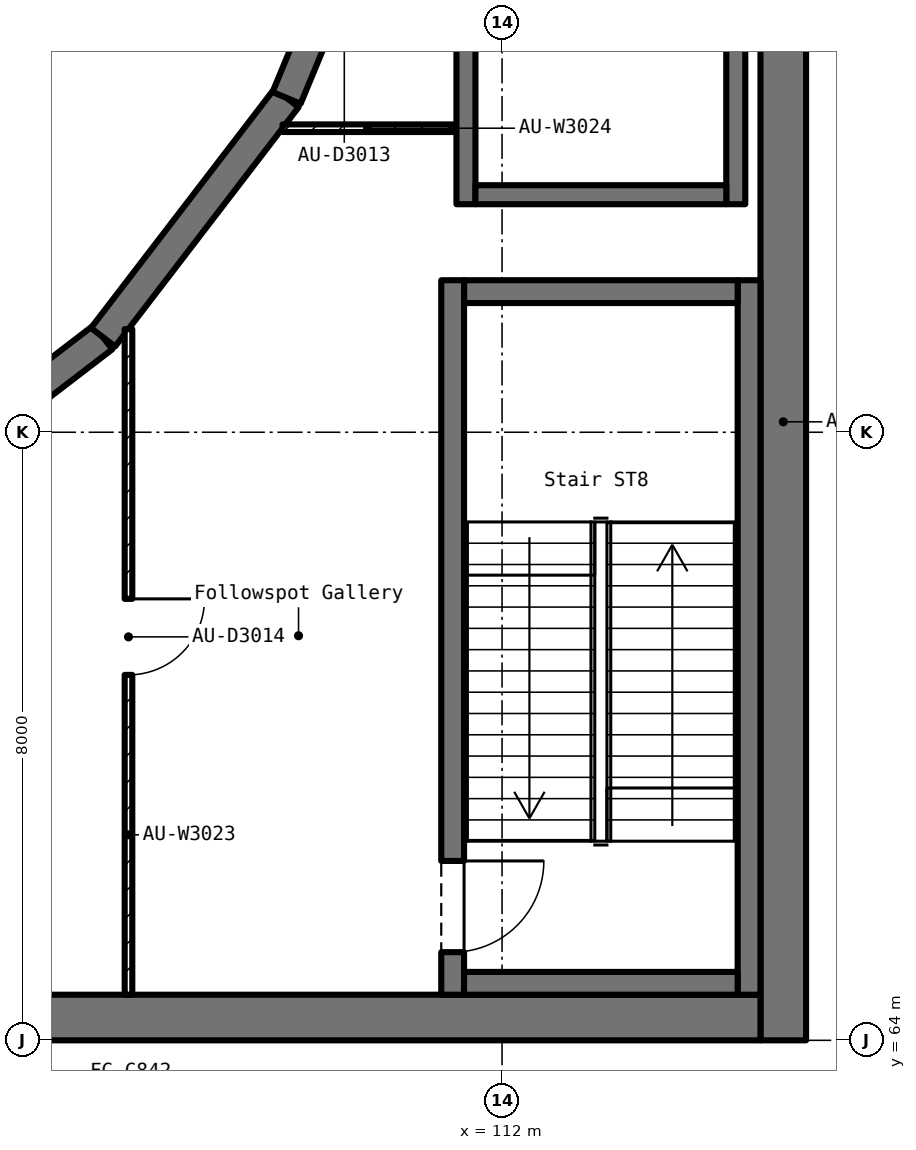
"""IFC4 building model, lengths in metres.
Left out: names, types, materials, properties, quantities, classifications, styles, units other than length and angle.
Written with IfcOpenShell. Run it as: python <this file> out.ifc"""

import sys

from ifc_helpers import new_model, si_unit, direction, frame, frame_2d, origin, place, context, subcontext, project, spatial, rectangle, extrude, element, fill, save


model = new_model("IFC4")
c1 = context("Model", 3, precision=1e-05, world=origin(), true_north=direction((0.0, 1.0)))
c2 = subcontext(c1, "Body", "Model", "MODEL_VIEW")
j1 = project(units=[si_unit("LENGTHUNIT", "METRE"), si_unit("PLANEANGLEUNIT", "RADIAN")], contexts=[c1])
p1 = place(None, origin())
s1 = spatial("IfcSite", under=j1, at=p1, CompositionType="ELEMENT")
p2 = place(p1, origin())
s2 = spatial("IfcBuilding", under=s1, at=p2, CompositionType="ELEMENT")
p3 = place(p2, frame((0.0, 0.0, 17.0)))
s3 = spatial("IfcBuildingStorey", under=s2, at=p3, CompositionType="ELEMENT", Elevation=17.0)
p4 = place(p3, frame((115.7, 64.0, 0.0), z_axis=(0.0, 0.0, 1.0), x_axis=(0.0, 1.0, 0.0)))
e1 = element("IfcWall", 1, at=p4, inside=s3, PredefinedType="SHEAR", context=c2, shape_type="SweptSolid", body=[
    extrude(rectangle(XDim=32.0, YDim=0.6, at=frame_2d((16.0, 0.0))), origin(), (0.0, 0.0, 1.0), 5.5),
])
p5 = place(p4, frame((16.275, 0.0, 1.0)))
e2 = element("IfcOpeningElement", 2, at=p5, cuts=e1, PredefinedType="OPENING", context=c2, shape_type="SweptSolid", body=[
    extrude(rectangle(XDim=0.45, YDim=3.6, at=frame_2d((0.225, 1.8))), frame((0.0, 0.312, 0.0), z_axis=(0.0, -1.0, 0.0), x_axis=(1.0, 0.0, 0.0)), (0.0, 0.0, 1.0), 0.624),
])
p6 = place(p4, frame((19.275, 0.0, 1.0)))
e3 = element("IfcOpeningElement", 3, at=p6, cuts=e1, PredefinedType="OPENING", context=c2, shape_type="SweptSolid", body=[
    extrude(rectangle(XDim=0.45, YDim=3.6, at=frame_2d((0.225, 1.8))), frame((0.0, 0.312, 0.0), z_axis=(0.0, -1.0, 0.0), x_axis=(1.0, 0.0, 0.0)), (0.0, 0.0, 1.0), 0.624),
])
p7 = place(p3, frame((76.6, 64.3, 0.0), z_axis=(0.0, 0.0, 1.0), x_axis=(1.0, 0.0, 0.0)))
e4 = element("IfcWall", 4, at=p7, inside=s3, PredefinedType="SHEAR", context=c2, shape_type="SweptSolid", body=[
    extrude(rectangle(XDim=38.8, YDim=0.6, at=frame_2d((19.4, 0.0))), origin(), (0.0, 0.0, 1.0), 5.5),
])
for number, where, z_axis, x_axis in (
    (5, (103.601, 70.835, 0.0), (0.0, 0.0, 1.0), (0.794, 0.609, 0.0)),
    (6, (106.75, 73.25, 0.0), (0.0, 0.0, 1.0), (0.609, 0.794, 0.0)),
):
    element("IfcWall", number, at=place(p3, frame(where, z_axis=z_axis, x_axis=x_axis)), inside=s3, PredefinedType="SHEAR", context=c2, shape_type="SweptSolid", body=[
        extrude(rectangle(XDim=3.969, YDim=0.4, at=frame_2d((1.984, 0.0))), origin(), (0.0, 0.0, 1.0), 5.5),
    ])
p8 = place(p3, frame((109.165, 76.399, 0.0), z_axis=(0.0, 0.0, 1.0), x_axis=(0.38271032831, 0.923868391388, 0.0)))
e7 = element("IfcWall", 7, at=p8, inside=s3, PredefinedType="SHEAR", context=c2, shape_type="SweptSolid", body=[
    extrude(rectangle(XDim=3.969, YDim=0.4, at=frame_2d((1.985, 0.0))), origin(), (0.0, 0.0, 1.0), 5.5),
])
p9 = place(p8, frame((1.084, 0.0, 0.0)))
e8 = element("IfcOpeningElement", 8, at=p9, cuts=e7, PredefinedType="OPENING", context=c2, shape_type="SweptSolid", body=[
    extrude(rectangle(XDim=1.8, YDim=2.1, at=frame_2d((0.9, 1.05))), frame((0.0, 0.212, 0.0), z_axis=(0.0, -1.0, 0.0), x_axis=(1.0, 0.0, 0.0)), (0.0, 0.0, 1.0), 0.424),
])
p10 = place(p3, frame((106.774, 62.848, 0.0), z_axis=(0.0, 0.0, 1.0), x_axis=(-0.990274070761, 0.13913038769, 0.0)))
e9 = element("IfcWall", 9, at=p10, inside=s3, PredefinedType="SOLIDWALL", context=c2, shape_type="SweptSolid", body=[
    extrude(rectangle(XDim=4.148, YDim=0.45, at=frame_2d((2.074, 0.0))), origin(), (0.0, 0.0, 1.0), 5.28),
])
p11 = place(p10, frame((1.074, 0.0, 1.0)))
e10 = element("IfcOpeningElement", 10, at=p11, cuts=e9, PredefinedType="OPENING", context=c2, shape_type="SweptSolid", body=[
    extrude(rectangle(XDim=2.0, YDim=2.8, at=frame_2d((1.0, 1.4))), frame((0.0, 0.237, 0.0), z_axis=(0.0, -1.0, 0.0), x_axis=(1.0, 0.0, 0.0)), (0.0, 0.0, 1.0), 0.474),
])
p12 = place(p3, frame((119.439, 72.137, 0.0), z_axis=(0.0, 0.0, 1.0), x_axis=(-0.961206014053, 0.275831467655, 0.0)))
e11 = element("IfcWall", 11, at=p12, inside=s3, PredefinedType="PARAPET", context=c2, shape_type="SweptSolid", body=[
    extrude(rectangle(XDim=3.571, YDim=0.3, at=frame_2d((1.786, 0.0))), origin(), (0.0, 0.0, 1.0), 1.1),
])
p13 = place(p3, frame((115.25, 64.6, 0.0), z_axis=(0.0, 0.0, 1.0), x_axis=(0.0, 1.0, 0.0)))
e12 = element("IfcWall", 12, at=p13, inside=s3, PredefinedType="SOLIDWALL", context=c2, shape_type="SweptSolid", body=[
    extrude(rectangle(XDim=9.4, YDim=0.3, at=frame_2d((4.7, 0.0))), origin(), (0.0, 0.0, 1.0), 5.5),
])
p14 = place(p3, frame((115.1, 73.85, 0.0), z_axis=(0.0, 0.0, 1.0), x_axis=(-1.0, 0.0, 0.0)))
e13 = element("IfcWall", 13, at=p14, inside=s3, PredefinedType="SOLIDWALL", context=c2, shape_type="SweptSolid", body=[
    extrude(rectangle(XDim=3.6, YDim=0.3, at=frame_2d((1.8, 0.0))), origin(), (0.0, 0.0, 1.0), 5.5),
])
p15 = place(p3, frame((111.35, 74.0, 0.0), z_axis=(0.0, 0.0, 1.0), x_axis=(0.0, -1.0, 0.0)))
e14 = element("IfcWall", 14, at=p15, inside=s3, PredefinedType="SOLIDWALL", context=c2, shape_type="SweptSolid", body=[
    extrude(rectangle(XDim=9.4, YDim=0.3, at=frame_2d((4.7, 0.0))), origin(), (0.0, 0.0, 1.0), 5.5),
])
p16 = place(p15, frame((7.64, 0.0, 0.0)))
e15 = element("IfcOpeningElement", 15, at=p16, cuts=e14, PredefinedType="OPENING", context=c2, shape_type="SweptSolid", body=[
    extrude(rectangle(XDim=1.2, YDim=2.1, at=frame_2d((0.6, 1.05))), frame((0.0, 0.162, 0.0), z_axis=(0.0, -1.0, 0.0), x_axis=(1.0, 0.0, 0.0)), (0.0, 0.0, 1.0), 0.324),
])
p17 = place(p3, frame((111.5, 64.75, 0.0), z_axis=(0.0, 0.0, 1.0), x_axis=(1.0, 0.0, 0.0)))
e16 = element("IfcWall", 16, at=p17, inside=s3, PredefinedType="SOLIDWALL", context=c2, shape_type="SweptSolid", body=[
    extrude(rectangle(XDim=3.6, YDim=0.3, at=frame_2d((1.8, 0.0))), origin(), (0.0, 0.0, 1.0), 5.5),
])
for number, where, z_axis, x_axis in (
    (17, (115.075, 75.0, 0.0), (0.0, 0.0, 1.0), (0.0, 1.0, 0.0)),
    (18, (111.525, 79.0, 0.0), (0.0, 0.0, 1.0), (0.0, -1.0, 0.0)),
):
    element("IfcWall", number, at=place(p3, frame(where, z_axis=z_axis, x_axis=x_axis)), inside=s3, PredefinedType="SOLIDWALL", context=c2, shape_type="SweptSolid", body=[
        extrude(rectangle(XDim=4.0, YDim=0.25, at=frame_2d((2.0, 0.0))), origin(), (0.0, 0.0, 1.0), 5.5),
    ])
p18 = place(p3, frame((111.65, 75.125, 0.0), z_axis=(0.0, 0.0, 1.0), x_axis=(1.0, 0.0, 0.0)))
e19 = element("IfcWall", 19, at=p18, inside=s3, PredefinedType="SOLIDWALL", context=c2, shape_type="SweptSolid", body=[
    extrude(rectangle(XDim=3.3, YDim=0.25, at=frame_2d((1.65, 0.0))), origin(), (0.0, 0.0, 1.0), 5.5),
])
p19 = place(p3, frame((107.085, 73.357, 0.0), z_axis=(0.0, 0.0, 1.0), x_axis=(0.0, -1.0, 0.0)))
e20 = element("IfcWall", 20, at=p19, inside=s3, PredefinedType="PARTITIONING", context=c2, shape_type="SweptSolid", body=[
    extrude(rectangle(XDim=8.757, YDim=0.1, at=frame_2d((4.378, 0.0))), origin(), (0.0, 0.0, 1.0), 4.3),
])
p20 = place(p19, frame((3.549, 0.0, 0.0)))
e21 = element("IfcOpeningElement", 21, at=p20, cuts=e20, PredefinedType="OPENING", context=c2, shape_type="SweptSolid", body=[
    extrude(rectangle(XDim=1.0, YDim=2.1, at=frame_2d((0.5, 1.05))), frame((0.0, 0.062, 0.0), z_axis=(0.0, -1.0, 0.0), x_axis=(1.0, 0.0, 0.0)), (0.0, 0.0, 1.0), 0.124),
])
p21 = place(p3, frame((111.35, 76.0, 0.0), z_axis=(0.0, 0.0, 1.0), x_axis=(-1.0, 0.0, 0.0)))
e22 = element("IfcWall", 22, at=p21, inside=s3, PredefinedType="PARTITIONING", context=c2, shape_type="SweptSolid", body=[
    extrude(rectangle(XDim=2.238, YDim=0.1, at=frame_2d((1.119, 0.0))), origin(), (0.0, 0.0, 1.0), 4.3),
])
p22 = place(p16, origin())
e23 = element("IfcDoor", 23, at=p22, inside=s3, OperationType="SINGLE_SWING_LEFT", PredefinedType="DOOR", context=c2, shape_type="SweptSolid", body=[
    extrude(rectangle(XDim=1.2, YDim=2.1, at=frame_2d((0.6, 1.05))), frame((0.0, 0.025, 0.0), z_axis=(0.0, -1.0, 0.0), x_axis=(1.0, 0.0, 0.0)), (0.0, 0.0, 1.0), 0.05),
])
fill(e15, e23)
p23 = place(p20, origin())
e24 = element("IfcDoor", 24, at=p23, inside=s3, OperationType="SINGLE_SWING_LEFT", PredefinedType="DOOR", context=c2, shape_type="SweptSolid", body=[
    extrude(rectangle(XDim=1.0, YDim=2.1, at=frame_2d((0.5, 1.05))), frame((0.0, 0.025, 0.0), z_axis=(0.0, -1.0, 0.0), x_axis=(1.0, 0.0, 0.0)), (0.0, 0.0, 1.0), 0.05),
])
fill(e21, e24)
save(model, sys.argv[1])
